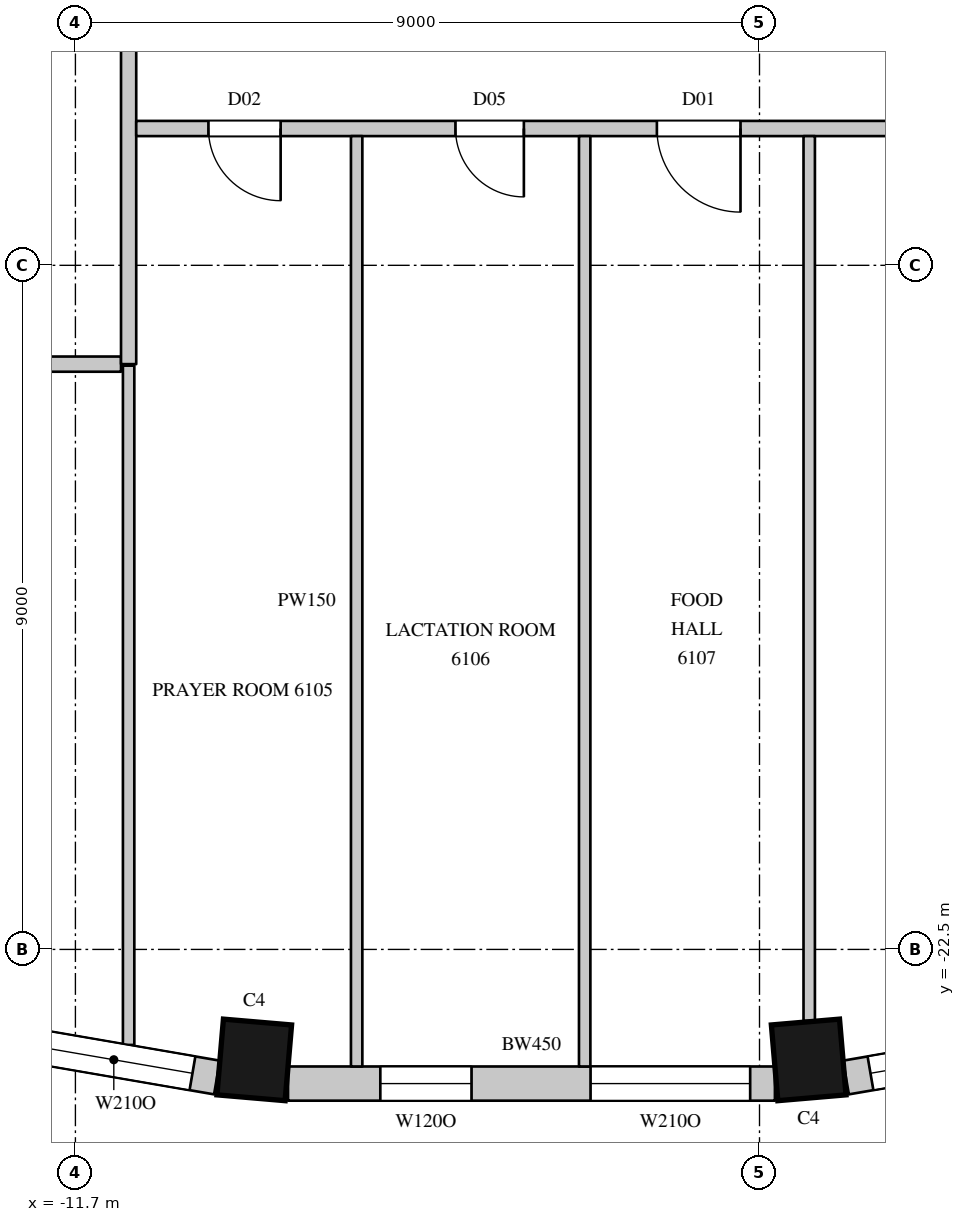
"""IFC4 building model, lengths in metres.
Left out: names, types, materials, properties, quantities, classifications, styles, units other than length and angle.
Written with IfcOpenShell. Run it as: python <this file> out.ifc"""

import sys

from ifc_helpers import new_model, si_unit, direction, frame, frame_2d, origin, origin_2d, place, context, subcontext, project, spatial, rectangle, extrude, element, fill, save


model = new_model("IFC4")
c1 = context("Model", 3, precision=1e-05, world=origin(), true_north=direction((0.0, 1.0)))
c2 = subcontext(c1, "Body", "Model", "MODEL_VIEW")
j1 = project(units=[si_unit("LENGTHUNIT", "METRE"), si_unit("PLANEANGLEUNIT", "RADIAN")], contexts=[c1])
p1 = place(None, origin())
s1 = spatial("IfcSite", under=j1, at=p1, CompositionType="ELEMENT")
p2 = place(p1, origin())
s2 = spatial("IfcBuilding", under=s1, at=p2, CompositionType="ELEMENT")
p3 = place(p2, frame((0.0, 0.0, 272.1)))
s3 = spatial("IfcBuildingStorey", under=s2, at=p3, CompositionType="ELEMENT", Elevation=272.1)
for number, where, z_axis, x_axis in (
    (1, (-9.347, -23.954, 0.0), (0.0, 0.0, 1.0), (0.996, -0.085, 0.0)),
    (2, (-2.053, -23.954, 0.0), (0.0, 0.0, 1.0), (0.996, 0.085, 0.0)),
):
    element("IfcColumn", number, at=place(p3, frame(where, z_axis=z_axis, x_axis=x_axis)), inside=s3, PredefinedType="COLUMN", context=c2, shape_type="SweptSolid", body=[
        extrude(rectangle(XDim=0.9, YDim=1.0, at=origin_2d()), origin(), (0.0, 0.0, 1.0), 4.1),
    ])
p4 = place(p3, frame((-16.157, -23.097, 0.0), z_axis=(0.0, 0.0, 1.0), x_axis=(0.985502073964, -0.169663379113, 0.0)))
e3 = element("IfcWall", 3, at=p4, inside=s3, PredefinedType="SOLIDWALL", context=c2, shape_type="SweptSolid", body=[
    extrude(rectangle(XDim=6.412, YDim=0.45, at=frame_2d((3.206, 0.0))), origin(), (0.0, 0.0, 1.0), 3.8),
])
p5 = place(p4, frame((0.327, 0.0, 1.05)))
e4 = element("IfcOpeningElement", 4, at=p5, cuts=e3, PredefinedType="OPENING", context=c2, shape_type="SweptSolid", body=[
    extrude(rectangle(XDim=2.1, YDim=2.4, at=frame_2d((1.05, 1.2))), frame((0.0, 0.235, 0.0), z_axis=(0.0, -1.0, 0.0), x_axis=(1.0, 0.0, 0.0)), (0.0, 0.0, 1.0), 0.47),
])
p6 = place(p4, frame((3.985, 0.0, 1.05)))
e5 = element("IfcOpeningElement", 5, at=p6, cuts=e3, PredefinedType="OPENING", context=c2, shape_type="SweptSolid", body=[
    extrude(rectangle(XDim=2.1, YDim=2.4, at=frame_2d((1.05, 1.2))), frame((0.0, 0.235, 0.0), z_axis=(0.0, -1.0, 0.0), x_axis=(1.0, 0.0, 0.0)), (0.0, 0.0, 1.0), 0.47),
])
p7 = place(p3, frame((-8.903, -24.265, 0.0), z_axis=(0.0, 0.0, 1.0), x_axis=(1.0, 0.0, 0.0)))
e6 = element("IfcWall", 6, at=p7, inside=s3, PredefinedType="SOLIDWALL", context=c2, shape_type="SweptSolid", body=[
    extrude(rectangle(XDim=6.406, YDim=0.45, at=frame_2d((3.203, 0.0))), origin(), (0.0, 0.0, 1.0), 3.8),
])
p8 = place(p7, frame((3.98, 0.0, 1.05)))
e7 = element("IfcOpeningElement", 7, at=p8, cuts=e6, PredefinedType="OPENING", context=c2, shape_type="SweptSolid", body=[
    extrude(rectangle(XDim=2.1, YDim=2.4, at=frame_2d((1.05, 1.2))), frame((0.0, 0.235, 0.0), z_axis=(0.0, -1.0, 0.0), x_axis=(1.0, 0.0, 0.0)), (0.0, 0.0, 1.0), 0.47),
])
p9 = place(p7, frame((1.214, 0.0, 1.05)))
e8 = element("IfcOpeningElement", 8, at=p9, cuts=e6, PredefinedType="OPENING", context=c2, shape_type="SweptSolid", body=[
    extrude(rectangle(XDim=1.2, YDim=2.4, at=frame_2d((0.6, 1.2))), frame((0.0, 0.235, 0.0), z_axis=(0.0, -1.0, 0.0), x_axis=(1.0, 0.0, 0.0)), (0.0, 0.0, 1.0), 0.47),
])
p10 = place(p3, frame((-1.562, -24.185, 0.0), z_axis=(0.0, 0.0, 1.0), x_axis=(0.985502073964, 0.169663379113, 0.0)))
e9 = element("IfcWall", 9, at=p10, inside=s3, PredefinedType="SOLIDWALL", context=c2, shape_type="SweptSolid", body=[
    extrude(rectangle(XDim=6.412, YDim=0.45, at=frame_2d((3.206, 0.0))), origin(), (0.0, 0.0, 1.0), 3.8),
])
p11 = place(p10, frame((0.327, 0.0, 1.05)))
e10 = element("IfcOpeningElement", 10, at=p11, cuts=e9, PredefinedType="OPENING", context=c2, shape_type="SweptSolid", body=[
    extrude(rectangle(XDim=2.1, YDim=2.4, at=frame_2d((1.05, 1.2))), frame((0.0, 0.235, 0.0), z_axis=(0.0, -1.0, 0.0), x_axis=(1.0, 0.0, 0.0)), (0.0, 0.0, 1.0), 0.47),
])
p12 = place(p10, frame((3.985, 0.0, 1.05)))
e11 = element("IfcOpeningElement", 11, at=p12, cuts=e9, PredefinedType="OPENING", context=c2, shape_type="SweptSolid", body=[
    extrude(rectangle(XDim=2.1, YDim=2.4, at=frame_2d((1.05, 1.2))), frame((0.0, 0.235, 0.0), z_axis=(0.0, -1.0, 0.0), x_axis=(1.0, 0.0, 0.0)), (0.0, 0.0, 1.0), 0.47),
])
p13 = place(p3, frame((-13.97, -14.8, 0.0), z_axis=(0.0, 0.0, 1.0), x_axis=(1.0, 0.0, 0.0)))
e12 = element("IfcWall", 12, at=p13, inside=s3, PredefinedType="PARTITIONING", context=c2, shape_type="SweptSolid", body=[
    extrude(rectangle(XDim=2.87, YDim=0.2, at=frame_2d((1.435, 0.0))), origin(), (0.0, 0.0, 1.0), 3.8),
])
p14 = place(p3, frame((-11.0, -14.8, 0.0), z_axis=(0.0, 0.0, 1.0), x_axis=(0.0, 1.0, 0.0)))
e13 = element("IfcWall", 13, at=p14, inside=s3, PredefinedType="PARTITIONING", context=c2, shape_type="SweptSolid", body=[
    extrude(rectangle(XDim=29.5, YDim=0.2, at=frame_2d((14.75, 0.0))), origin(), (0.0, 0.0, 1.0), 3.8),
])
p15 = place(p14, frame((17.9, 0.0, 0.0)))
e14 = element("IfcOpeningElement", 14, at=p15, cuts=e13, PredefinedType="OPENING", context=c2, shape_type="SweptSolid", body=[
    extrude(rectangle(XDim=1.5, YDim=2.4, at=frame_2d((0.75, 1.2))), frame((0.0, 0.11, 0.0), z_axis=(0.0, -1.0, 0.0), x_axis=(1.0, 0.0, 0.0)), (0.0, 0.0, 1.0), 0.22),
])
p16 = place(p3, frame((-10.9, -11.7, 0.0), z_axis=(0.0, 0.0, 1.0), x_axis=(1.0, 0.0, 0.0)))
e15 = element("IfcWall", 15, at=p16, inside=s3, PredefinedType="PARTITIONING", context=c2, shape_type="SweptSolid", body=[
    extrude(rectangle(XDim=21.5, YDim=0.2, at=frame_2d((10.75, 0.0))), origin(), (0.0, 0.0, 1.0), 3.8),
])
p17 = place(p16, frame((0.95, 0.0, 0.0)))
e16 = element("IfcOpeningElement", 16, at=p17, cuts=e15, PredefinedType="OPENING", context=c2, shape_type="SweptSolid", body=[
    extrude(rectangle(XDim=0.95, YDim=2.2, at=frame_2d((0.475, 1.1))), frame((0.0, 0.11, 0.0), z_axis=(0.0, -1.0, 0.0), x_axis=(1.0, 0.0, 0.0)), (0.0, 0.0, 1.0), 0.22),
])
p18 = place(p16, frame((4.2, 0.0, 0.0)))
e17 = element("IfcOpeningElement", 17, at=p18, cuts=e15, PredefinedType="OPENING", context=c2, shape_type="SweptSolid", body=[
    extrude(rectangle(XDim=0.9, YDim=2.2, at=frame_2d((0.45, 1.1))), frame((0.0, 0.11, 0.0), z_axis=(0.0, -1.0, 0.0), x_axis=(1.0, 0.0, 0.0)), (0.0, 0.0, 1.0), 0.22),
])
p19 = place(p16, frame((6.85, 0.0, 0.0)))
e18 = element("IfcOpeningElement", 18, at=p19, cuts=e15, PredefinedType="OPENING", context=c2, shape_type="SweptSolid", body=[
    extrude(rectangle(XDim=1.1, YDim=2.4, at=frame_2d((0.55, 1.2))), frame((0.0, 0.11, 0.0), z_axis=(0.0, -1.0, 0.0), x_axis=(1.0, 0.0, 0.0)), (0.0, 0.0, 1.0), 0.22),
])
p20 = place(p16, frame((9.95, 0.0, 0.0)))
e19 = element("IfcOpeningElement", 19, at=p20, cuts=e15, PredefinedType="OPENING", context=c2, shape_type="SweptSolid", body=[
    extrude(rectangle(XDim=1.1, YDim=2.4, at=frame_2d((0.55, 1.2))), frame((0.0, 0.11, 0.0), z_axis=(0.0, -1.0, 0.0), x_axis=(1.0, 0.0, 0.0)), (0.0, 0.0, 1.0), 0.22),
])
p21 = place(p3, frame((-11.0, -23.757, 0.0), z_axis=(0.0, 0.0, 1.0), x_axis=(0.0, 1.0, 0.0)))
e20 = element("IfcWall", 20, at=p21, inside=s3, PredefinedType="PARTITIONING", context=c2, shape_type="SweptSolid", body=[
    extrude(rectangle(XDim=8.937, YDim=0.15, at=frame_2d((4.468, 0.0))), origin(), (0.0, 0.0, 1.0), 3.8),
])
for number, where, z_axis, x_axis in (
    (21, (-8.0, -24.04, 0.0), (0.0, 0.0, 1.0), (0.0, 1.0, 0.0)),
    (22, (-5.0, -24.04, 0.0), (0.0, 0.0, 1.0), (0.0, 1.0, 0.0)),
):
    element("IfcWall", number, at=place(p3, frame(where, z_axis=z_axis, x_axis=x_axis)), inside=s3, PredefinedType="PARTITIONING", context=c2, shape_type="SweptSolid", body=[
        extrude(rectangle(XDim=12.24, YDim=0.15, at=frame_2d((6.12, 0.0))), origin(), (0.0, 0.0, 1.0), 3.8),
    ])
p22 = place(p3, frame((-2.046, -23.441, 0.0), z_axis=(0.0, 0.0, 1.0), x_axis=(0.0, 1.0, 0.0)))
e23 = element("IfcWall", 23, at=p22, inside=s3, PredefinedType="PARTITIONING", context=c2, shape_type="SweptSolid", body=[
    extrude(rectangle(XDim=11.641, YDim=0.15, at=frame_2d((5.821, 0.0))), origin(), (0.0, 0.0, 1.0), 3.8),
])
p23 = place(p6, origin())
e24 = element("IfcWindow", 24, at=p23, inside=s3, PartitioningType="SINGLE_PANEL", PredefinedType="WINDOW", context=c2, shape_type="SweptSolid", body=[
    extrude(rectangle(XDim=2.1, YDim=2.4, at=frame_2d((1.05, 1.2))), frame((0.0, 0.135, 0.0), z_axis=(0.0, -1.0, 0.0), x_axis=(1.0, 0.0, 0.0)), (0.0, 0.0, 1.0), 0.06),
])
fill(e5, e24)
p24 = place(p8, origin())
e25 = element("IfcWindow", 25, at=p24, inside=s3, PartitioningType="SINGLE_PANEL", PredefinedType="WINDOW", context=c2, shape_type="SweptSolid", body=[
    extrude(rectangle(XDim=2.1, YDim=2.4, at=frame_2d((1.05, 1.2))), frame((0.0, 0.135, 0.0), z_axis=(0.0, -1.0, 0.0), x_axis=(1.0, 0.0, 0.0)), (0.0, 0.0, 1.0), 0.06),
])
fill(e7, e25)
p25 = place(p11, origin())
e26 = element("IfcWindow", 26, at=p25, inside=s3, PartitioningType="SINGLE_PANEL", PredefinedType="WINDOW", context=c2, shape_type="SweptSolid", body=[
    extrude(rectangle(XDim=2.1, YDim=2.4, at=frame_2d((1.05, 1.2))), frame((0.0, 0.135, 0.0), z_axis=(0.0, -1.0, 0.0), x_axis=(1.0, 0.0, 0.0)), (0.0, 0.0, 1.0), 0.06),
])
fill(e10, e26)
p26 = place(p17, origin())
e27 = element("IfcDoor", 27, at=p26, inside=s3, OperationType="SINGLE_SWING_LEFT", PredefinedType="DOOR", context=c2, shape_type="SweptSolid", body=[
    extrude(rectangle(XDim=0.95, YDim=2.2, at=frame_2d((0.475, 1.1))), frame((0.0, 0.025, 0.0), z_axis=(0.0, -1.0, 0.0), x_axis=(1.0, 0.0, 0.0)), (0.0, 0.0, 1.0), 0.05),
])
fill(e16, e27)
p27 = place(p18, origin())
e28 = element("IfcDoor", 28, at=p27, inside=s3, OperationType="SINGLE_SWING_LEFT", PredefinedType="DOOR", context=c2, shape_type="SweptSolid", body=[
    extrude(rectangle(XDim=0.9, YDim=2.2, at=frame_2d((0.45, 1.1))), frame((0.0, 0.025, 0.0), z_axis=(0.0, -1.0, 0.0), x_axis=(1.0, 0.0, 0.0)), (0.0, 0.0, 1.0), 0.05),
])
fill(e17, e28)
p28 = place(p19, origin())
e29 = element("IfcDoor", 29, at=p28, inside=s3, OperationType="SINGLE_SWING_LEFT", PredefinedType="DOOR", context=c2, shape_type="SweptSolid", body=[
    extrude(rectangle(XDim=1.1, YDim=2.4, at=frame_2d((0.55, 1.2))), frame((0.0, 0.025, 0.0), z_axis=(0.0, -1.0, 0.0), x_axis=(1.0, 0.0, 0.0)), (0.0, 0.0, 1.0), 0.05),
])
fill(e18, e29)
p29 = place(p9, origin())
e30 = element("IfcWindow", 30, at=p29, inside=s3, PartitioningType="SINGLE_PANEL", PredefinedType="WINDOW", context=c2, shape_type="SweptSolid", body=[
    extrude(rectangle(XDim=1.2, YDim=2.4, at=frame_2d((0.6, 1.2))), frame((0.0, 0.135, 0.0), z_axis=(0.0, -1.0, 0.0), x_axis=(1.0, 0.0, 0.0)), (0.0, 0.0, 1.0), 0.06),
])
fill(e8, e30)
save(model, sys.argv[1])
